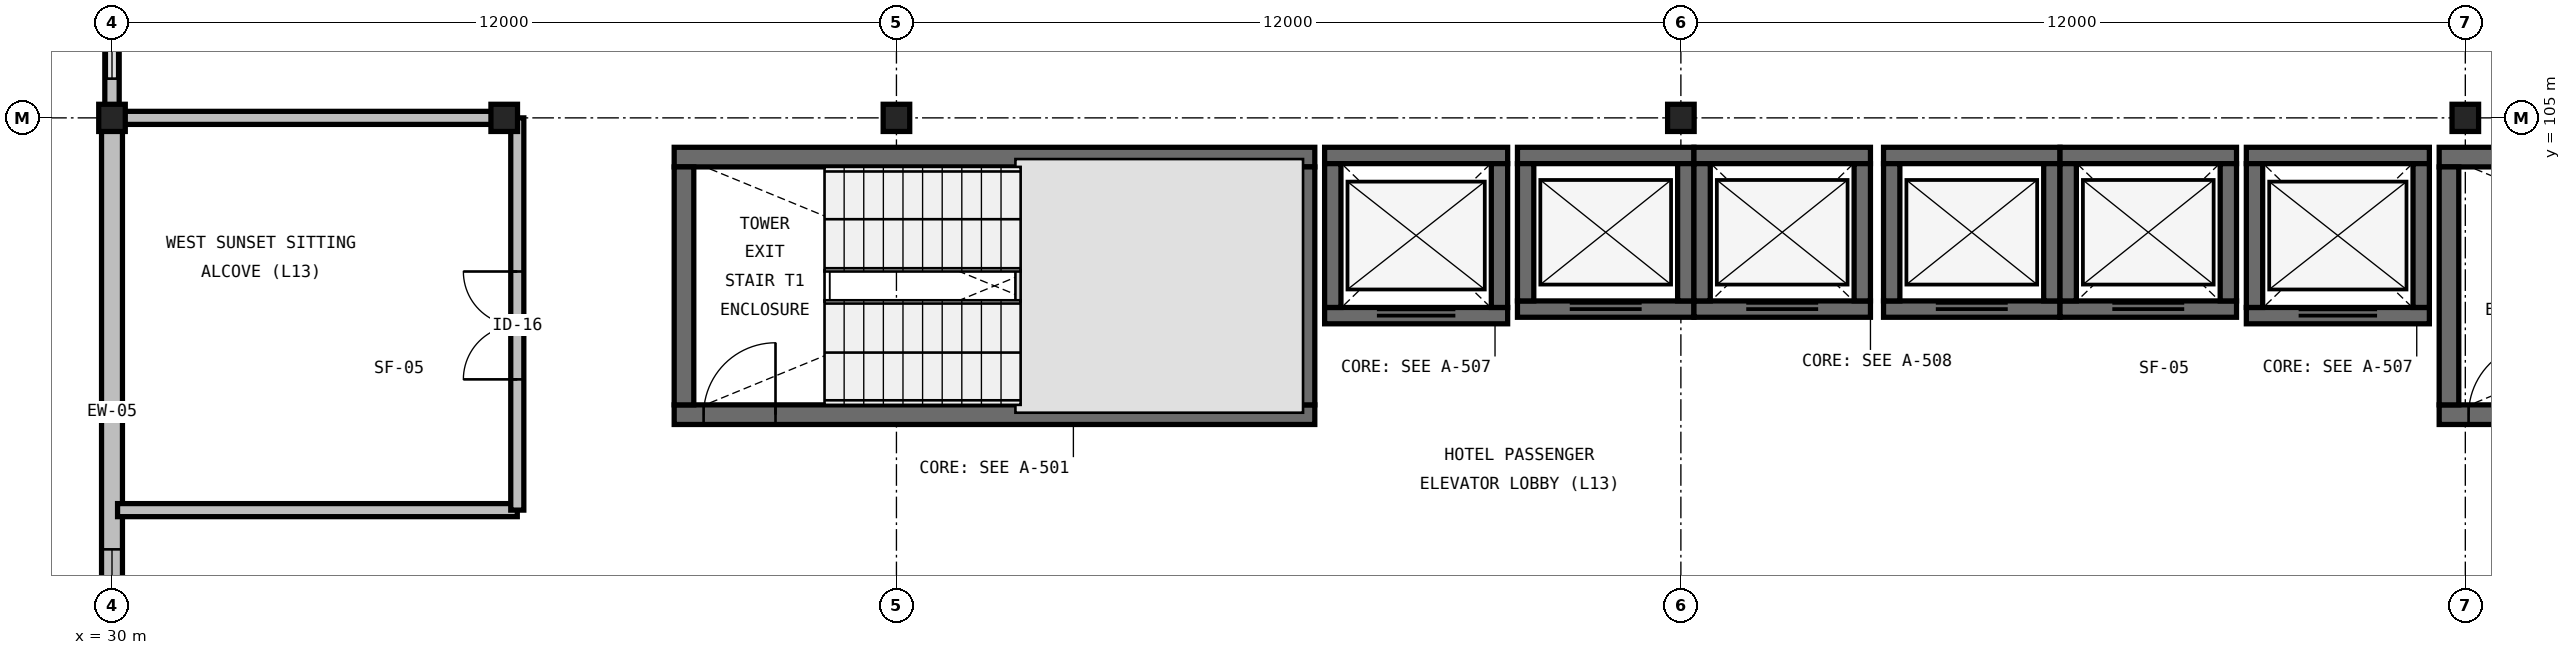
"""IFC4 building model, lengths in metres.
Left out: names, types, materials, properties, quantities, classifications, styles, units other than length and angle.
Written with IfcOpenShell. Run it as: python <this file> out.ifc"""

import sys

from ifc_helpers import new_model, si_unit, direction, frame, frame_2d, origin, origin_2d, place, context, subcontext, project, spatial, rectangle, i_section, extrude, element, fill, save


model = new_model("IFC4")
c1 = context("Model", 3, precision=1e-05, world=origin(), true_north=direction((0.0, 1.0)))
c2 = subcontext(c1, "Body", "Model", "MODEL_VIEW")
j1 = project(units=[si_unit("LENGTHUNIT", "METRE"), si_unit("PLANEANGLEUNIT", "RADIAN")], contexts=[c1])
p1 = place(None, origin())
s1 = spatial("IfcSite", under=j1, at=p1, CompositionType="ELEMENT")
p2 = place(p1, origin())
s2 = spatial("IfcBuilding", under=s1, at=p2, CompositionType="ELEMENT")
p3 = place(p2, frame((0.0, 0.0, 56.4)))
s3 = spatial("IfcBuildingStorey", under=s2, at=p3, CompositionType="ELEMENT", Elevation=56.4)
for number, where, z_axis, x_axis in (
    (1, (30.0, 105.0, 0.0), (0.0, 0.0, 1.0), (1.0, 0.0, 0.0)),
    (2, (36.0, 105.0, 0.0), (0.0, 0.0, 1.0), (1.0, 0.0, 0.0)),
    (3, (42.0, 105.0, 0.0), (0.0, 0.0, 1.0), (1.0, 0.0, 0.0)),
    (4, (54.0, 105.0, 0.0), (0.0, 0.0, 1.0), (1.0, 0.0, 0.0)),
    (5, (66.0, 105.0, 0.0), (0.0, 0.0, 1.0), (1.0, 0.0, 0.0)),
):
    element("IfcColumn", number, at=place(p3, frame(where, z_axis=z_axis, x_axis=x_axis)), inside=s3, PredefinedType="COLUMN", context=c2, shape_type="SweptSolid", body=[
        extrude(i_section(OverallWidth=0.406, OverallDepth=0.416, WebThickness=0.03, FlangeThickness=0.048, FilletRadius=0.031, at=origin_2d()), origin(), (0.0, 0.0, 1.0), 3.6),
    ])
p4 = place(p3, frame((38.6, 100.46, 0.0), z_axis=(0.0, 0.0, 1.0), x_axis=(1.0, 0.0, 0.0)))
e6 = element("IfcWall", 6, at=p4, inside=s3, PredefinedType="SHEAR", context=c2, shape_type="SweptSolid", body=[
    extrude(rectangle(XDim=9.8, YDim=0.3, at=frame_2d((4.9, 0.0))), origin(), (0.0, 0.0, 1.0), 3.6),
])
p5 = place(p4, frame((0.45, 0.0, 0.0)))
e7 = element("IfcOpeningElement", 7, at=p5, cuts=e6, PredefinedType="OPENING", context=c2, shape_type="SweptSolid", body=[
    extrude(rectangle(XDim=1.1, YDim=2.2, at=frame_2d((0.55, 1.1))), frame((0.0, 0.165, 0.0), z_axis=(0.0, -1.0, 0.0), x_axis=(1.0, 0.0, 0.0)), (0.0, 0.0, 1.0), 0.33),
])
p6 = place(p3, frame((48.4, 104.4, 0.0), z_axis=(0.0, 0.0, 1.0), x_axis=(-1.0, 0.0, 0.0)))
e8 = element("IfcWall", 8, at=p6, inside=s3, PredefinedType="SHEAR", context=c2, shape_type="SweptSolid", body=[
    extrude(rectangle(XDim=9.8, YDim=0.3, at=frame_2d((4.9, 0.0))), origin(), (0.0, 0.0, 1.0), 3.6),
])
for number, where, z_axis, x_axis in (
    (9, (38.75, 104.25, 0.0), (0.0, 0.0, 1.0), (0.0, -1.0, 0.0)),
    (10, (48.25, 100.61, 0.0), (0.0, 0.0, 1.0), (0.0, 1.0, 0.0)),
):
    element("IfcWall", number, at=place(p3, frame(where, z_axis=z_axis, x_axis=x_axis)), inside=s3, PredefinedType="SHEAR", context=c2, shape_type="SweptSolid", body=[
        extrude(rectangle(XDim=3.64, YDim=0.3, at=frame_2d((1.82, 0.0))), origin(), (0.0, 0.0, 1.0), 3.6),
    ])
p7 = place(p3, frame((65.6, 100.46, 0.0), z_axis=(0.0, 0.0, 1.0), x_axis=(1.0, 0.0, 0.0)))
e11 = element("IfcWall", 11, at=p7, inside=s3, PredefinedType="SHEAR", context=c2, shape_type="SweptSolid", body=[
    extrude(rectangle(XDim=9.8, YDim=0.3, at=frame_2d((4.9, 0.0))), origin(), (0.0, 0.0, 1.0), 3.6),
])
p8 = place(p7, frame((0.45, 0.0, 0.0)))
e12 = element("IfcOpeningElement", 12, at=p8, cuts=e11, PredefinedType="OPENING", context=c2, shape_type="SweptSolid", body=[
    extrude(rectangle(XDim=1.1, YDim=2.2, at=frame_2d((0.55, 1.1))), frame((0.0, 0.165, 0.0), z_axis=(0.0, -1.0, 0.0), x_axis=(1.0, 0.0, 0.0)), (0.0, 0.0, 1.0), 0.33),
])
p9 = place(p3, frame((75.4, 104.4, 0.0), z_axis=(0.0, 0.0, 1.0), x_axis=(-1.0, 0.0, 0.0)))
e13 = element("IfcWall", 13, at=p9, inside=s3, PredefinedType="SHEAR", context=c2, shape_type="SweptSolid", body=[
    extrude(rectangle(XDim=9.8, YDim=0.3, at=frame_2d((4.9, 0.0))), origin(), (0.0, 0.0, 1.0), 3.6),
])
p10 = place(p3, frame((65.75, 104.25, 0.0), z_axis=(0.0, 0.0, 1.0), x_axis=(0.0, -1.0, 0.0)))
e14 = element("IfcWall", 14, at=p10, inside=s3, PredefinedType="SHEAR", context=c2, shape_type="SweptSolid", body=[
    extrude(rectangle(XDim=3.64, YDim=0.3, at=frame_2d((1.82, 0.0))), origin(), (0.0, 0.0, 1.0), 3.6),
])
p11 = place(p3, frame((48.55, 101.975, 0.0), z_axis=(0.0, 0.0, 1.0), x_axis=(1.0, 0.0, 0.0)))
e15 = element("IfcWall", 15, at=p11, inside=s3, PredefinedType="SHEAR", context=c2, shape_type="SweptSolid", body=[
    extrude(rectangle(XDim=2.8, YDim=0.25, at=frame_2d((1.4, 0.0))), origin(), (0.0, 0.0, 1.0), 3.6),
])
p12 = place(p11, frame((0.8, 0.0, 0.0)))
e16 = element("IfcOpeningElement", 16, at=p12, cuts=e15, PredefinedType="OPENING", context=c2, shape_type="SweptSolid", body=[
    extrude(rectangle(XDim=1.2, YDim=2.2, at=frame_2d((0.6, 1.1))), frame((0.0, 0.14, 0.0), z_axis=(0.0, -1.0, 0.0), x_axis=(1.0, 0.0, 0.0)), (0.0, 0.0, 1.0), 0.28),
])
p13 = place(p3, frame((51.35, 104.425, 0.0), z_axis=(0.0, 0.0, 1.0), x_axis=(-1.0, 0.0, 0.0)))
e17 = element("IfcWall", 17, at=p13, inside=s3, PredefinedType="SHEAR", context=c2, shape_type="SweptSolid", body=[
    extrude(rectangle(XDim=2.8, YDim=0.25, at=frame_2d((1.4, 0.0))), origin(), (0.0, 0.0, 1.0), 3.6),
])
for number, where, z_axis, x_axis in (
    (18, (48.675, 104.3, 0.0), (0.0, 0.0, 1.0), (0.0, -1.0, 0.0)),
    (19, (51.225, 102.1, 0.0), (0.0, 0.0, 1.0), (0.0, 1.0, 0.0)),
):
    element("IfcWall", number, at=place(p3, frame(where, z_axis=z_axis, x_axis=x_axis)), inside=s3, PredefinedType="SHEAR", context=c2, shape_type="SweptSolid", body=[
        extrude(rectangle(XDim=2.2, YDim=0.25, at=frame_2d((1.1, 0.0))), origin(), (0.0, 0.0, 1.0), 3.6),
    ])
p14 = place(p3, frame((62.65, 101.975, 0.0), z_axis=(0.0, 0.0, 1.0), x_axis=(1.0, 0.0, 0.0)))
e20 = element("IfcWall", 20, at=p14, inside=s3, PredefinedType="SHEAR", context=c2, shape_type="SweptSolid", body=[
    extrude(rectangle(XDim=2.8, YDim=0.25, at=frame_2d((1.4, 0.0))), origin(), (0.0, 0.0, 1.0), 3.6),
])
p15 = place(p14, frame((0.8, 0.0, 0.0)))
e21 = element("IfcOpeningElement", 21, at=p15, cuts=e20, PredefinedType="OPENING", context=c2, shape_type="SweptSolid", body=[
    extrude(rectangle(XDim=1.2, YDim=2.2, at=frame_2d((0.6, 1.1))), frame((0.0, 0.14, 0.0), z_axis=(0.0, -1.0, 0.0), x_axis=(1.0, 0.0, 0.0)), (0.0, 0.0, 1.0), 0.28),
])
p16 = place(p3, frame((65.45, 104.425, 0.0), z_axis=(0.0, 0.0, 1.0), x_axis=(-1.0, 0.0, 0.0)))
e22 = element("IfcWall", 22, at=p16, inside=s3, PredefinedType="SHEAR", context=c2, shape_type="SweptSolid", body=[
    extrude(rectangle(XDim=2.8, YDim=0.25, at=frame_2d((1.4, 0.0))), origin(), (0.0, 0.0, 1.0), 3.6),
])
for number, where, z_axis, x_axis in (
    (23, (62.775, 104.3, 0.0), (0.0, 0.0, 1.0), (0.0, -1.0, 0.0)),
    (24, (65.325, 102.1, 0.0), (0.0, 0.0, 1.0), (0.0, 1.0, 0.0)),
):
    element("IfcWall", number, at=place(p3, frame(where, z_axis=z_axis, x_axis=x_axis)), inside=s3, PredefinedType="SHEAR", context=c2, shape_type="SweptSolid", body=[
        extrude(rectangle(XDim=2.2, YDim=0.25, at=frame_2d((1.1, 0.0))), origin(), (0.0, 0.0, 1.0), 3.6),
    ])
p17 = place(p3, frame((51.5, 102.075, 0.0), z_axis=(0.0, 0.0, 1.0), x_axis=(1.0, 0.0, 0.0)))
e25 = element("IfcWall", 25, at=p17, inside=s3, PredefinedType="SHEAR", context=c2, shape_type="SweptSolid", body=[
    extrude(rectangle(XDim=2.7, YDim=0.25, at=frame_2d((1.35, 0.0))), origin(), (0.0, 0.0, 1.0), 3.6),
])
p18 = place(p17, frame((0.8, 0.0, 0.0)))
e26 = element("IfcOpeningElement", 26, at=p18, cuts=e25, PredefinedType="OPENING", context=c2, shape_type="SweptSolid", body=[
    extrude(rectangle(XDim=1.1, YDim=2.2, at=frame_2d((0.55, 1.1))), frame((0.0, 0.14, 0.0), z_axis=(0.0, -1.0, 0.0), x_axis=(1.0, 0.0, 0.0)), (0.0, 0.0, 1.0), 0.28),
])
p19 = place(p3, frame((54.2, 104.425, 0.0), z_axis=(0.0, 0.0, 1.0), x_axis=(-1.0, 0.0, 0.0)))
e27 = element("IfcWall", 27, at=p19, inside=s3, PredefinedType="SHEAR", context=c2, shape_type="SweptSolid", body=[
    extrude(rectangle(XDim=2.7, YDim=0.25, at=frame_2d((1.35, 0.0))), origin(), (0.0, 0.0, 1.0), 3.6),
])
for number, where, z_axis, x_axis in (
    (28, (51.625, 104.3, 0.0), (0.0, 0.0, 1.0), (0.0, -1.0, 0.0)),
    (29, (54.075, 102.2, 0.0), (0.0, 0.0, 1.0), (0.0, 1.0, 0.0)),
):
    element("IfcWall", number, at=place(p3, frame(where, z_axis=z_axis, x_axis=x_axis)), inside=s3, PredefinedType="SHEAR", context=c2, shape_type="SweptSolid", body=[
        extrude(rectangle(XDim=2.1, YDim=0.25, at=frame_2d((1.05, 0.0))), origin(), (0.0, 0.0, 1.0), 3.6),
    ])
p20 = place(p3, frame((54.2, 102.075, 0.0), z_axis=(0.0, 0.0, 1.0), x_axis=(1.0, 0.0, 0.0)))
e30 = element("IfcWall", 30, at=p20, inside=s3, PredefinedType="SHEAR", context=c2, shape_type="SweptSolid", body=[
    extrude(rectangle(XDim=2.7, YDim=0.25, at=frame_2d((1.35, 0.0))), origin(), (0.0, 0.0, 1.0), 3.6),
])
p21 = place(p20, frame((0.8, 0.0, 0.0)))
e31 = element("IfcOpeningElement", 31, at=p21, cuts=e30, PredefinedType="OPENING", context=c2, shape_type="SweptSolid", body=[
    extrude(rectangle(XDim=1.1, YDim=2.2, at=frame_2d((0.55, 1.1))), frame((0.0, 0.14, 0.0), z_axis=(0.0, -1.0, 0.0), x_axis=(1.0, 0.0, 0.0)), (0.0, 0.0, 1.0), 0.28),
])
p22 = place(p3, frame((56.9, 104.425, 0.0), z_axis=(0.0, 0.0, 1.0), x_axis=(-1.0, 0.0, 0.0)))
e32 = element("IfcWall", 32, at=p22, inside=s3, PredefinedType="SHEAR", context=c2, shape_type="SweptSolid", body=[
    extrude(rectangle(XDim=2.7, YDim=0.25, at=frame_2d((1.35, 0.0))), origin(), (0.0, 0.0, 1.0), 3.6),
])
for number, where, z_axis, x_axis in (
    (33, (54.325, 104.3, 0.0), (0.0, 0.0, 1.0), (0.0, -1.0, 0.0)),
    (34, (56.775, 102.2, 0.0), (0.0, 0.0, 1.0), (0.0, 1.0, 0.0)),
):
    element("IfcWall", number, at=place(p3, frame(where, z_axis=z_axis, x_axis=x_axis)), inside=s3, PredefinedType="SHEAR", context=c2, shape_type="SweptSolid", body=[
        extrude(rectangle(XDim=2.1, YDim=0.25, at=frame_2d((1.05, 0.0))), origin(), (0.0, 0.0, 1.0), 3.6),
    ])
p23 = place(p3, frame((57.1, 102.075, 0.0), z_axis=(0.0, 0.0, 1.0), x_axis=(1.0, 0.0, 0.0)))
e35 = element("IfcWall", 35, at=p23, inside=s3, PredefinedType="SHEAR", context=c2, shape_type="SweptSolid", body=[
    extrude(rectangle(XDim=2.7, YDim=0.25, at=frame_2d((1.35, 0.0))), origin(), (0.0, 0.0, 1.0), 3.6),
])
p24 = place(p23, frame((0.8, 0.0, 0.0)))
e36 = element("IfcOpeningElement", 36, at=p24, cuts=e35, PredefinedType="OPENING", context=c2, shape_type="SweptSolid", body=[
    extrude(rectangle(XDim=1.1, YDim=2.2, at=frame_2d((0.55, 1.1))), frame((0.0, 0.14, 0.0), z_axis=(0.0, -1.0, 0.0), x_axis=(1.0, 0.0, 0.0)), (0.0, 0.0, 1.0), 0.28),
])
p25 = place(p3, frame((59.8, 104.425, 0.0), z_axis=(0.0, 0.0, 1.0), x_axis=(-1.0, 0.0, 0.0)))
e37 = element("IfcWall", 37, at=p25, inside=s3, PredefinedType="SHEAR", context=c2, shape_type="SweptSolid", body=[
    extrude(rectangle(XDim=2.7, YDim=0.25, at=frame_2d((1.35, 0.0))), origin(), (0.0, 0.0, 1.0), 3.6),
])
for number, where, z_axis, x_axis in (
    (38, (57.225, 104.3, 0.0), (0.0, 0.0, 1.0), (0.0, -1.0, 0.0)),
    (39, (59.675, 102.2, 0.0), (0.0, 0.0, 1.0), (0.0, 1.0, 0.0)),
):
    element("IfcWall", number, at=place(p3, frame(where, z_axis=z_axis, x_axis=x_axis)), inside=s3, PredefinedType="SHEAR", context=c2, shape_type="SweptSolid", body=[
        extrude(rectangle(XDim=2.1, YDim=0.25, at=frame_2d((1.05, 0.0))), origin(), (0.0, 0.0, 1.0), 3.6),
    ])
p26 = place(p3, frame((59.8, 102.075, 0.0), z_axis=(0.0, 0.0, 1.0), x_axis=(1.0, 0.0, 0.0)))
e40 = element("IfcWall", 40, at=p26, inside=s3, PredefinedType="SHEAR", context=c2, shape_type="SweptSolid", body=[
    extrude(rectangle(XDim=2.7, YDim=0.25, at=frame_2d((1.35, 0.0))), origin(), (0.0, 0.0, 1.0), 3.6),
])
p27 = place(p26, frame((0.8, 0.0, 0.0)))
e41 = element("IfcOpeningElement", 41, at=p27, cuts=e40, PredefinedType="OPENING", context=c2, shape_type="SweptSolid", body=[
    extrude(rectangle(XDim=1.1, YDim=2.2, at=frame_2d((0.55, 1.1))), frame((0.0, 0.14, 0.0), z_axis=(0.0, -1.0, 0.0), x_axis=(1.0, 0.0, 0.0)), (0.0, 0.0, 1.0), 0.28),
])
p28 = place(p3, frame((62.5, 104.425, 0.0), z_axis=(0.0, 0.0, 1.0), x_axis=(-1.0, 0.0, 0.0)))
e42 = element("IfcWall", 42, at=p28, inside=s3, PredefinedType="SHEAR", context=c2, shape_type="SweptSolid", body=[
    extrude(rectangle(XDim=2.7, YDim=0.25, at=frame_2d((1.35, 0.0))), origin(), (0.0, 0.0, 1.0), 3.6),
])
for number, where, z_axis, x_axis in (
    (43, (59.925, 104.3, 0.0), (0.0, 0.0, 1.0), (0.0, -1.0, 0.0)),
    (44, (62.375, 102.2, 0.0), (0.0, 0.0, 1.0), (0.0, 1.0, 0.0)),
):
    element("IfcWall", number, at=place(p3, frame(where, z_axis=z_axis, x_axis=x_axis)), inside=s3, PredefinedType="SHEAR", context=c2, shape_type="SweptSolid", body=[
        extrude(rectangle(XDim=2.1, YDim=0.25, at=frame_2d((1.05, 0.0))), origin(), (0.0, 0.0, 1.0), 3.6),
    ])
p29 = place(p3, frame((30.0, 105.0, 0.0), z_axis=(0.0, 0.0, 1.0), x_axis=(0.0, -1.0, 0.0)))
e45 = element("IfcWall", 45, at=p29, inside=s3, PredefinedType="STANDARD", context=c2, shape_type="SweptSolid", body=[
    extrude(rectangle(XDim=9.0, YDim=0.32, at=frame_2d((4.5, 0.0))), origin(), (0.0, 0.0, 1.0), 2.981),
])
p30 = place(p29, frame((6.6, 0.0, 0.85)))
e46 = element("IfcOpeningElement", 46, at=p30, cuts=e45, PredefinedType="OPENING", context=c2, shape_type="SweptSolid", body=[
    extrude(rectangle(XDim=1.8, YDim=1.5, at=frame_2d((0.9, 0.75))), frame((0.0, 0.175, 0.0), z_axis=(0.0, -1.0, 0.0), x_axis=(1.0, 0.0, 0.0)), (0.0, 0.0, 1.0), 0.35),
])
p31 = place(p3, frame((30.0, 117.0, 0.0), z_axis=(0.0, 0.0, 1.0), x_axis=(0.0, -1.0, 0.0)))
e47 = element("IfcWall", 47, at=p31, inside=s3, PredefinedType="PARAPET", context=c2, shape_type="SweptSolid", body=[
    extrude(rectangle(XDim=12.0, YDim=0.22, at=frame_2d((6.0, 0.0))), origin(), (0.0, 0.0, 1.0), 0.2),
])
p32 = place(p3, frame((30.085, 99.0, 0.0), z_axis=(0.0, 0.0, 1.0), x_axis=(1.0, 0.0, 0.0)))
e48 = element("IfcWall", 48, at=p32, inside=s3, PredefinedType="PARTITIONING", context=c2, shape_type="SweptSolid", body=[
    extrude(rectangle(XDim=6.115, YDim=0.2, at=frame_2d((3.057, 0.0))), origin(), (0.0, 0.0, 1.0), 3.29),
])
p33 = place(p3, frame((36.2, 99.0, 0.0), z_axis=(0.0, 0.0, 1.0), x_axis=(0.0, 1.0, 0.0)))
e49 = element("IfcWall", 49, at=p33, inside=s3, PredefinedType="PARTITIONING", context=c2, shape_type="SweptSolid", body=[
    extrude(rectangle(XDim=6.0, YDim=0.2, at=frame_2d((3.0, 0.0))), origin(), (0.0, 0.0, 1.0), 3.29),
])
p34 = place(p33, frame((2.0, 0.0, 0.0)))
e50 = element("IfcOpeningElement", 50, at=p34, cuts=e49, PredefinedType="OPENING", context=c2, shape_type="SweptSolid", body=[
    extrude(rectangle(XDim=1.65, YDim=2.25, at=frame_2d((0.825, 1.125))), frame((0.0, 0.115, 0.0), z_axis=(0.0, -1.0, 0.0), x_axis=(1.0, 0.0, 0.0)), (0.0, 0.0, 1.0), 0.23),
])
p35 = place(p3, frame((36.2, 105.0, 0.0), z_axis=(0.0, 0.0, 1.0), x_axis=(-1.0, 0.0, 0.0)))
e51 = element("IfcWall", 51, at=p35, inside=s3, PredefinedType="PARTITIONING", context=c2, shape_type="SweptSolid", body=[
    extrude(rectangle(XDim=6.115, YDim=0.2, at=frame_2d((3.057, 0.0))), origin(), (0.0, 0.0, 1.0), 2.736),
])
p36 = place(p5, origin())
e52 = element("IfcDoor", 52, at=p36, inside=s3, OperationType="SINGLE_SWING_RIGHT", PredefinedType="DOOR", context=c2, shape_type="SweptSolid", body=[
    extrude(rectangle(XDim=1.1, YDim=2.2, at=frame_2d((0.55, 1.1))), frame((0.0, 0.025, 0.0), z_axis=(0.0, -1.0, 0.0), x_axis=(1.0, 0.0, 0.0)), (0.0, 0.0, 1.0), 0.05),
])
fill(e7, e52)
p37 = place(p8, origin())
e53 = element("IfcDoor", 53, at=p37, inside=s3, OperationType="SINGLE_SWING_RIGHT", PredefinedType="DOOR", context=c2, shape_type="SweptSolid", body=[
    extrude(rectangle(XDim=1.1, YDim=2.2, at=frame_2d((0.55, 1.1))), frame((0.0, 0.025, 0.0), z_axis=(0.0, -1.0, 0.0), x_axis=(1.0, 0.0, 0.0)), (0.0, 0.0, 1.0), 0.05),
])
fill(e12, e53)
p38 = place(p12, origin())
e54 = element("IfcDoor", 54, at=p38, inside=s3, OperationType="DOUBLE_DOOR_SLIDING", PredefinedType="DOOR", context=c2, shape_type="SweptSolid", body=[
    extrude(rectangle(XDim=1.2, YDim=2.2, at=frame_2d((0.6, 1.1))), frame((0.0, 0.025, 0.0), z_axis=(0.0, -1.0, 0.0), x_axis=(1.0, 0.0, 0.0)), (0.0, 0.0, 1.0), 0.05),
])
fill(e16, e54)
p39 = place(p15, origin())
e55 = element("IfcDoor", 55, at=p39, inside=s3, OperationType="DOUBLE_DOOR_SLIDING", PredefinedType="DOOR", context=c2, shape_type="SweptSolid", body=[
    extrude(rectangle(XDim=1.2, YDim=2.2, at=frame_2d((0.6, 1.1))), frame((0.0, 0.025, 0.0), z_axis=(0.0, -1.0, 0.0), x_axis=(1.0, 0.0, 0.0)), (0.0, 0.0, 1.0), 0.05),
])
fill(e21, e55)
p40 = place(p18, origin())
e56 = element("IfcDoor", 56, at=p40, inside=s3, OperationType="DOUBLE_DOOR_SLIDING", PredefinedType="DOOR", context=c2, shape_type="SweptSolid", body=[
    extrude(rectangle(XDim=1.1, YDim=2.2, at=frame_2d((0.55, 1.1))), frame((0.0, 0.025, 0.0), z_axis=(0.0, -1.0, 0.0), x_axis=(1.0, 0.0, 0.0)), (0.0, 0.0, 1.0), 0.05),
])
fill(e26, e56)
p41 = place(p21, origin())
e57 = element("IfcDoor", 57, at=p41, inside=s3, OperationType="DOUBLE_DOOR_SLIDING", PredefinedType="DOOR", context=c2, shape_type="SweptSolid", body=[
    extrude(rectangle(XDim=1.1, YDim=2.2, at=frame_2d((0.55, 1.1))), frame((0.0, 0.025, 0.0), z_axis=(0.0, -1.0, 0.0), x_axis=(1.0, 0.0, 0.0)), (0.0, 0.0, 1.0), 0.05),
])
fill(e31, e57)
p42 = place(p24, origin())
e58 = element("IfcDoor", 58, at=p42, inside=s3, OperationType="DOUBLE_DOOR_SLIDING", PredefinedType="DOOR", context=c2, shape_type="SweptSolid", body=[
    extrude(rectangle(XDim=1.1, YDim=2.2, at=frame_2d((0.55, 1.1))), frame((0.0, 0.025, 0.0), z_axis=(0.0, -1.0, 0.0), x_axis=(1.0, 0.0, 0.0)), (0.0, 0.0, 1.0), 0.05),
])
fill(e36, e58)
p43 = place(p27, origin())
e59 = element("IfcDoor", 59, at=p43, inside=s3, OperationType="DOUBLE_DOOR_SLIDING", PredefinedType="DOOR", context=c2, shape_type="SweptSolid", body=[
    extrude(rectangle(XDim=1.1, YDim=2.2, at=frame_2d((0.55, 1.1))), frame((0.0, 0.025, 0.0), z_axis=(0.0, -1.0, 0.0), x_axis=(1.0, 0.0, 0.0)), (0.0, 0.0, 1.0), 0.05),
])
fill(e41, e59)
p44 = place(p30, origin())
e60 = element("IfcWindow", 60, at=p44, inside=s3, PartitioningType="SINGLE_PANEL", PredefinedType="WINDOW", context=c2, shape_type="SweptSolid", body=[
    extrude(rectangle(XDim=1.8, YDim=1.5, at=frame_2d((0.9, 0.75))), frame((0.0, 0.03, 0.0), z_axis=(0.0, -1.0, 0.0), x_axis=(1.0, 0.0, 0.0)), (0.0, 0.0, 1.0), 0.06),
])
fill(e46, e60)
p45 = place(p34, origin())
e61 = element("IfcDoor", 61, at=p45, inside=s3, OperationType="DOUBLE_DOOR_SINGLE_SWING", PredefinedType="DOOR", context=c2, shape_type="SweptSolid", body=[
    extrude(rectangle(XDim=1.65, YDim=2.25, at=frame_2d((0.825, 1.125))), frame((0.0, 0.025, 0.0), z_axis=(0.0, -1.0, 0.0), x_axis=(1.0, 0.0, 0.0)), (0.0, 0.0, 1.0), 0.05),
])
fill(e50, e61)
save(model, sys.argv[1])
